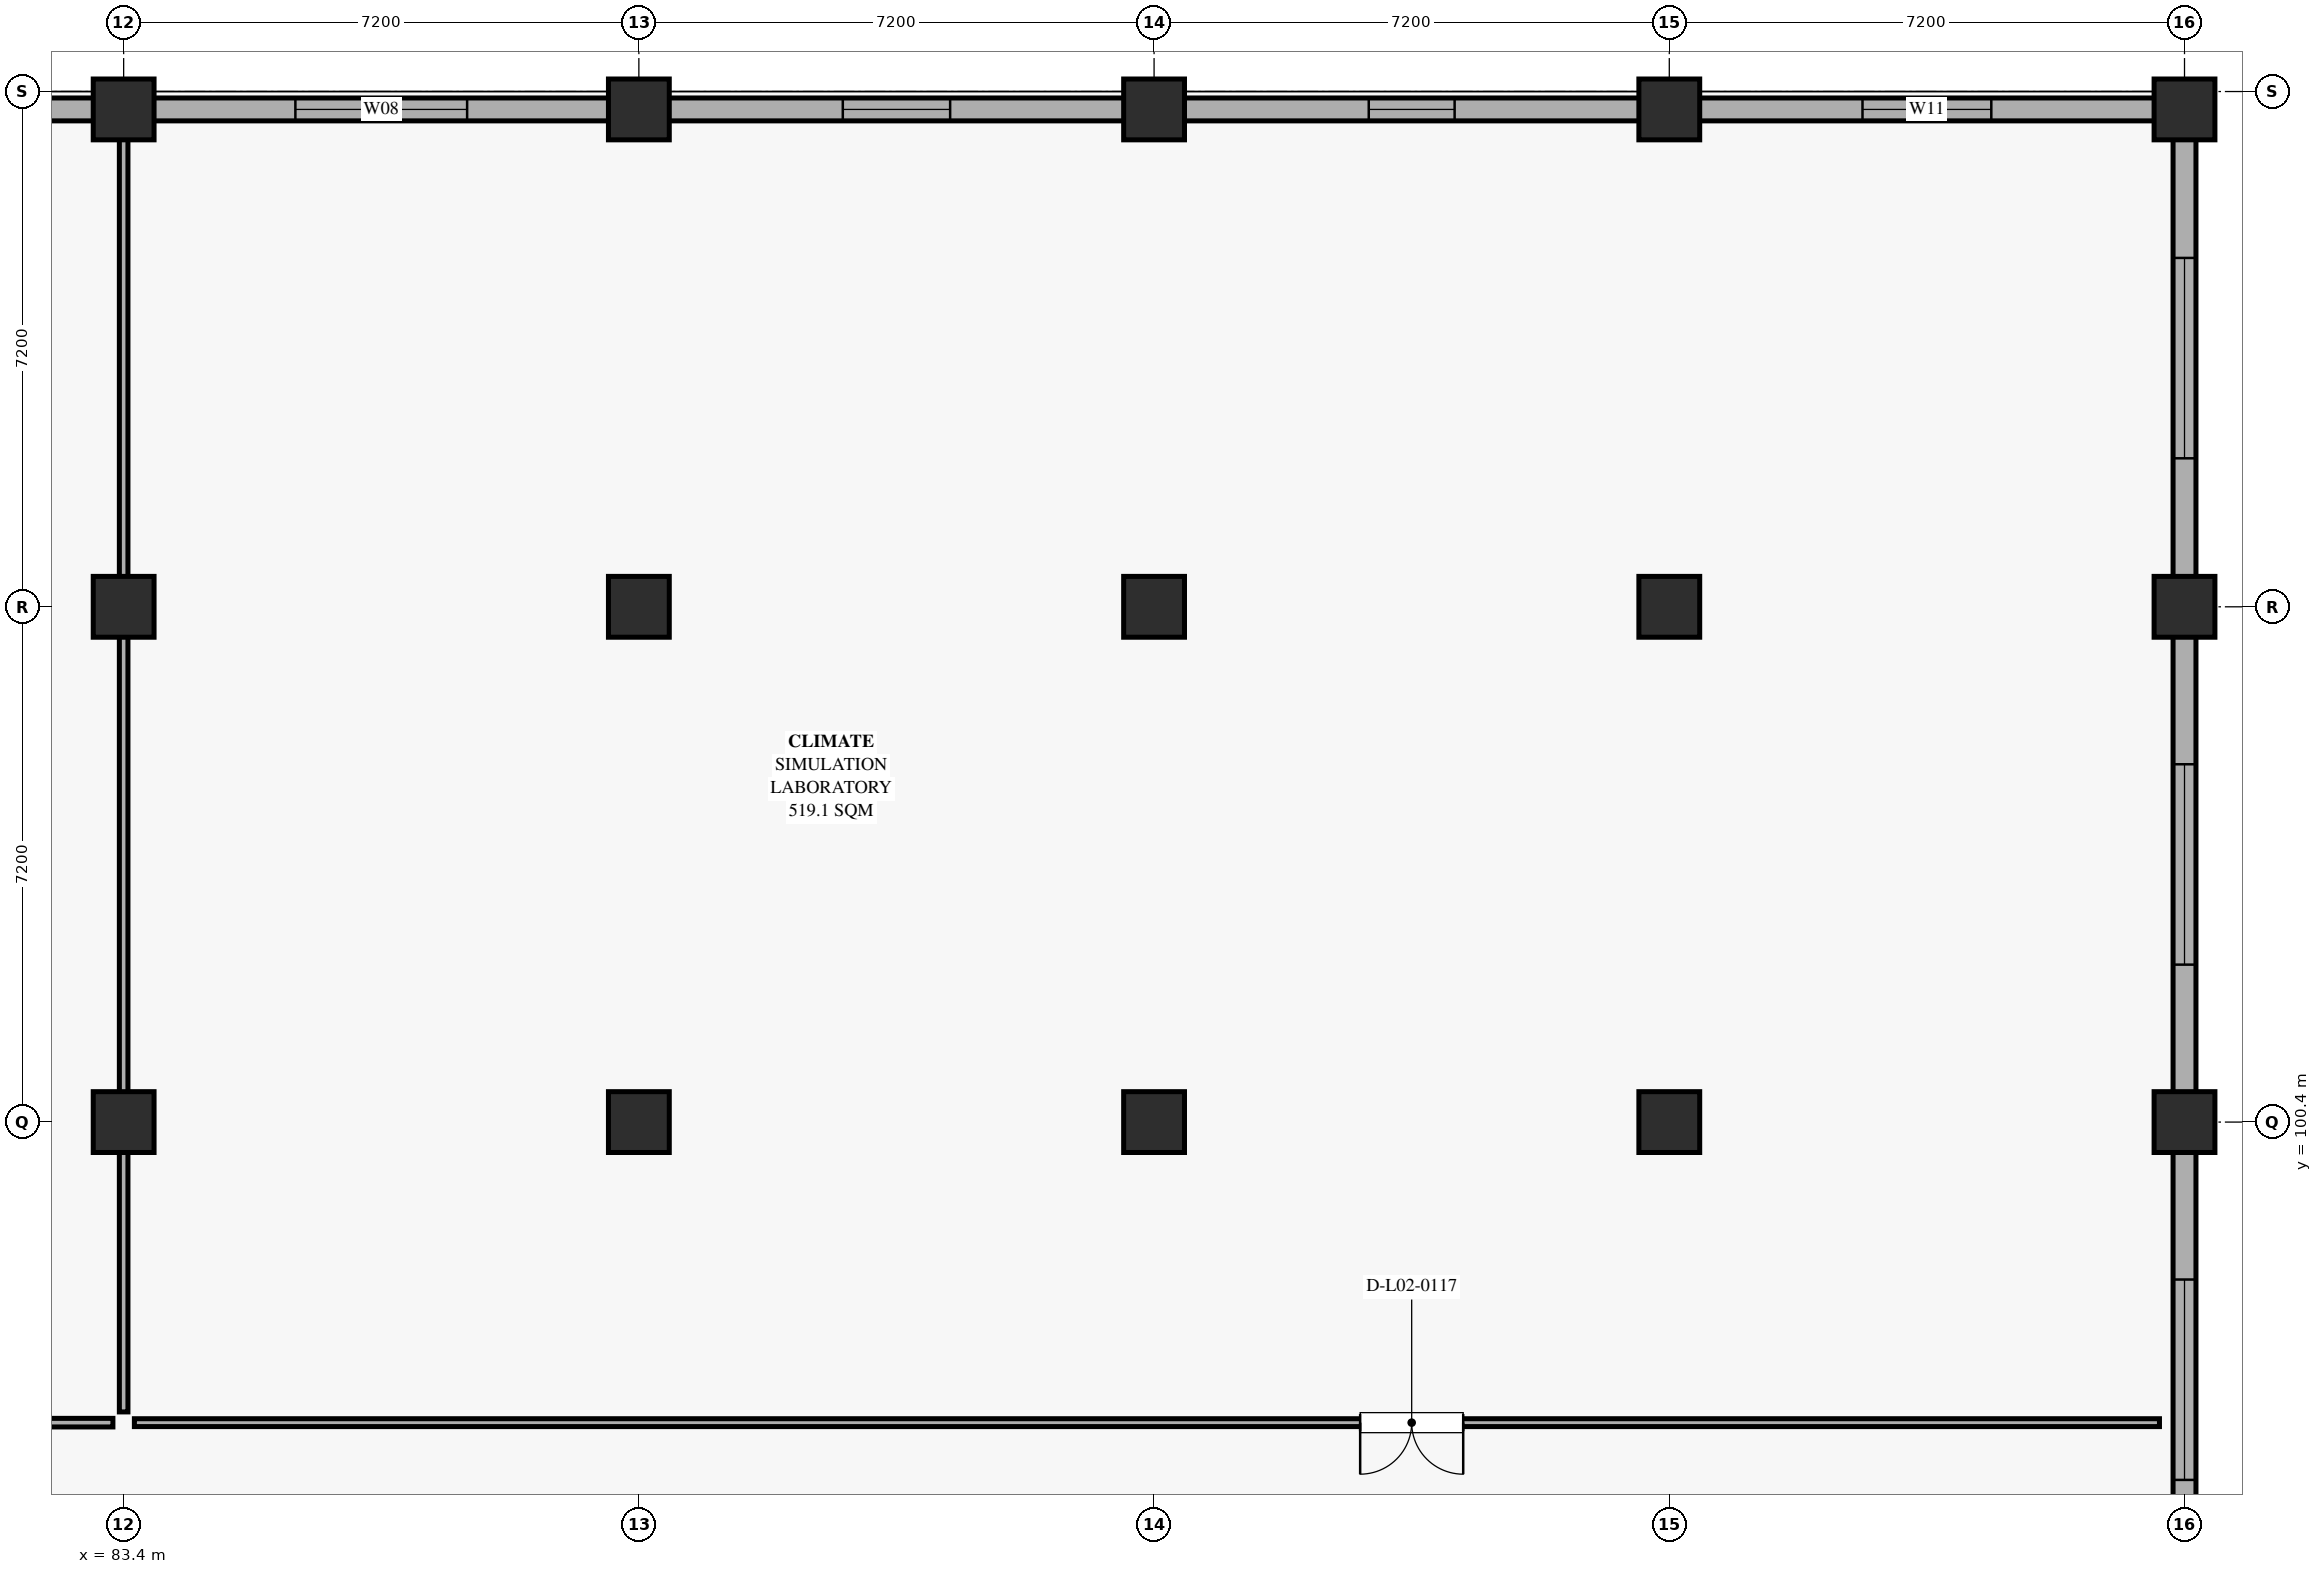
"""IFC4 building model, lengths in metres.
Left out: names, types, materials, properties, quantities, classifications, styles, units other than length and angle.
Written with IfcOpenShell. Run it as: python <this file> out.ifc"""

import sys

from ifc_helpers import new_model, si_unit, direction, frame, frame_2d, origin, origin_2d, place, context, subcontext, project, spatial, rectangle, extrude, element, fill, save


model = new_model("IFC4")
c1 = context("Model", 3, precision=1e-05, world=origin(), true_north=direction((0.0, 1.0)))
c2 = subcontext(c1, "Body", "Model", "MODEL_VIEW")
j1 = project(units=[si_unit("LENGTHUNIT", "METRE"), si_unit("PLANEANGLEUNIT", "RADIAN")], contexts=[c1])
p1 = place(None, origin())
s1 = spatial("IfcSite", under=j1, at=p1, CompositionType="ELEMENT")
p2 = place(p1, origin())
s2 = spatial("IfcBuilding", under=s1, at=p2, CompositionType="ELEMENT")
p3 = place(p2, frame((0.0, 0.0, 10.44)))
s3 = spatial("IfcBuildingStorey", under=s2, at=p3, CompositionType="ELEMENT", Elevation=10.44)
for number, where, z_axis, x_axis in (
    (1, (83.4, 100.4, 0.0), (0.0, 0.0, 1.0), (1.0, 0.0, 0.0)),
    (2, (90.6, 100.4, 0.0), (0.0, 0.0, 1.0), (1.0, 0.0, 0.0)),
    (3, (97.8, 100.4, 0.0), (0.0, 0.0, 1.0), (1.0, 0.0, 0.0)),
    (4, (105.0, 100.4, 0.0), (0.0, 0.0, 1.0), (1.0, 0.0, 0.0)),
    (5, (112.2, 100.4, 0.0), (0.0, 0.0, 1.0), (1.0, 0.0, 0.0)),
    (6, (83.4, 107.6, 0.0), (0.0, 0.0, 1.0), (1.0, 0.0, 0.0)),
    (7, (90.6, 107.6, 0.0), (0.0, 0.0, 1.0), (1.0, 0.0, 0.0)),
    (8, (97.8, 107.6, 0.0), (0.0, 0.0, 1.0), (1.0, 0.0, 0.0)),
    (9, (105.0, 107.6, 0.0), (0.0, 0.0, 1.0), (1.0, 0.0, 0.0)),
    (10, (112.2, 107.6, 0.0), (0.0, 0.0, 1.0), (1.0, 0.0, 0.0)),
    (11, (83.4, 114.55, 0.0), (0.0, 0.0, 1.0), (1.0, 0.0, 0.0)),
    (12, (90.6, 114.55, 0.0), (0.0, 0.0, 1.0), (1.0, 0.0, 0.0)),
    (13, (97.8, 114.55, 0.0), (0.0, 0.0, 1.0), (1.0, 0.0, 0.0)),
    (14, (105.0, 114.55, 0.0), (0.0, 0.0, 1.0), (1.0, 0.0, 0.0)),
    (15, (112.2, 114.55, 0.0), (0.0, 0.0, 1.0), (1.0, 0.0, 0.0)),
):
    element("IfcColumn", number, at=place(p3, frame(where, z_axis=z_axis, x_axis=x_axis)), inside=s3, PredefinedType="COLUMN", context=c2, shape_type="SweptSolid", body=[
        extrude(rectangle(XDim=0.85, YDim=0.85, at=origin_2d()), origin(), (0.0, 0.0, 1.0), 4.68),
    ])
p4 = place(p3, frame((112.2, 99.99, 0.0), z_axis=(0.0, 0.0, 1.0), x_axis=(0.0, -1.0, 0.0)))
e16 = element("IfcWall", 16, at=p4, inside=s3, PredefinedType="SOLIDWALL", context=c2, shape_type="SweptSolid", body=[
    extrude(rectangle(XDim=6.38, YDim=0.32, at=frame_2d((3.19, 0.0))), origin(), (0.0, 0.0, 1.0), 3.18),
])
p5 = place(p4, frame((1.79, 0.0, 0.85)))
e17 = element("IfcOpeningElement", 17, at=p5, cuts=e16, PredefinedType="OPENING", context=c2, shape_type="SweptSolid", body=[
    extrude(rectangle(XDim=2.8, YDim=2.2, at=frame_2d((1.4, 1.1))), frame((0.0, 0.17, 0.0), z_axis=(0.0, -1.0, 0.0), x_axis=(1.0, 0.0, 0.0)), (0.0, 0.0, 1.0), 0.34),
])
p6 = place(p3, frame((112.2, 107.19, 0.0), z_axis=(0.0, 0.0, 1.0), x_axis=(0.0, -1.0, 0.0)))
e18 = element("IfcWall", 18, at=p6, inside=s3, PredefinedType="SOLIDWALL", context=c2, shape_type="SweptSolid", body=[
    extrude(rectangle(XDim=6.38, YDim=0.32, at=frame_2d((3.19, 0.0))), origin(), (0.0, 0.0, 1.0), 3.18),
])
p7 = place(p6, frame((1.79, 0.0, 0.85)))
e19 = element("IfcOpeningElement", 19, at=p7, cuts=e18, PredefinedType="OPENING", context=c2, shape_type="SweptSolid", body=[
    extrude(rectangle(XDim=2.8, YDim=2.2, at=frame_2d((1.4, 1.1))), frame((0.0, 0.17, 0.0), z_axis=(0.0, -1.0, 0.0), x_axis=(1.0, 0.0, 0.0)), (0.0, 0.0, 1.0), 0.34),
])
p8 = place(p3, frame((112.2, 114.14, 0.0), z_axis=(0.0, 0.0, 1.0), x_axis=(0.0, -1.0, 0.0)))
e20 = element("IfcWall", 20, at=p8, inside=s3, PredefinedType="SOLIDWALL", context=c2, shape_type="SweptSolid", body=[
    extrude(rectangle(XDim=6.13, YDim=0.32, at=frame_2d((3.065, 0.0))), origin(), (0.0, 0.0, 1.0), 3.18),
])
p9 = place(p8, frame((1.665, 0.0, 0.85)))
e21 = element("IfcOpeningElement", 21, at=p9, cuts=e20, PredefinedType="OPENING", context=c2, shape_type="SweptSolid", body=[
    extrude(rectangle(XDim=2.8, YDim=2.2, at=frame_2d((1.4, 1.1))), frame((0.0, 0.17, 0.0), z_axis=(0.0, -1.0, 0.0), x_axis=(1.0, 0.0, 0.0)), (0.0, 0.0, 1.0), 0.34),
])
p10 = place(p3, frame((76.61, 114.55, 0.0), z_axis=(0.0, 0.0, 1.0), x_axis=(1.0, 0.0, 0.0)))
e22 = element("IfcWall", 22, at=p10, inside=s3, PredefinedType="SOLIDWALL", context=c2, shape_type="SweptSolid", body=[
    extrude(rectangle(XDim=6.38, YDim=0.32, at=frame_2d((3.19, 0.0))), origin(), (0.0, 0.0, 1.0), 3.18),
])
p11 = place(p10, frame((2.14, 0.0, 0.85)))
e23 = element("IfcOpeningElement", 23, at=p11, cuts=e22, PredefinedType="OPENING", context=c2, shape_type="SweptSolid", body=[
    extrude(rectangle(XDim=2.1, YDim=2.1, at=frame_2d((1.05, 1.05))), frame((0.0, 0.17, 0.0), z_axis=(0.0, -1.0, 0.0), x_axis=(1.0, 0.0, 0.0)), (0.0, 0.0, 1.0), 0.34),
])
p12 = place(p3, frame((83.81, 114.55, 0.0), z_axis=(0.0, 0.0, 1.0), x_axis=(1.0, 0.0, 0.0)))
e24 = element("IfcWall", 24, at=p12, inside=s3, PredefinedType="SOLIDWALL", context=c2, shape_type="SweptSolid", body=[
    extrude(rectangle(XDim=6.38, YDim=0.32, at=frame_2d((3.19, 0.0))), origin(), (0.0, 0.0, 1.0), 3.18),
])
p13 = place(p12, frame((1.99, 0.0, 0.85)))
e25 = element("IfcOpeningElement", 25, at=p13, cuts=e24, PredefinedType="OPENING", context=c2, shape_type="SweptSolid", body=[
    extrude(rectangle(XDim=2.4, YDim=2.1, at=frame_2d((1.2, 1.05))), frame((0.0, 0.17, 0.0), z_axis=(0.0, -1.0, 0.0), x_axis=(1.0, 0.0, 0.0)), (0.0, 0.0, 1.0), 0.34),
])
p14 = place(p3, frame((91.01, 114.55, 0.0), z_axis=(0.0, 0.0, 1.0), x_axis=(1.0, 0.0, 0.0)))
e26 = element("IfcWall", 26, at=p14, inside=s3, PredefinedType="SOLIDWALL", context=c2, shape_type="SweptSolid", body=[
    extrude(rectangle(XDim=6.38, YDim=0.32, at=frame_2d((3.19, 0.0))), origin(), (0.0, 0.0, 1.0), 3.18),
])
p15 = place(p14, frame((2.44, 0.0, 0.85)))
e27 = element("IfcOpeningElement", 27, at=p15, cuts=e26, PredefinedType="OPENING", context=c2, shape_type="SweptSolid", body=[
    extrude(rectangle(XDim=1.5, YDim=2.1, at=frame_2d((0.75, 1.05))), frame((0.0, 0.17, 0.0), z_axis=(0.0, -1.0, 0.0), x_axis=(1.0, 0.0, 0.0)), (0.0, 0.0, 1.0), 0.34),
])
p16 = place(p3, frame((98.21, 114.55, 0.0), z_axis=(0.0, 0.0, 1.0), x_axis=(1.0, 0.0, 0.0)))
e28 = element("IfcWall", 28, at=p16, inside=s3, PredefinedType="SOLIDWALL", context=c2, shape_type="SweptSolid", body=[
    extrude(rectangle(XDim=6.38, YDim=0.32, at=frame_2d((3.19, 0.0))), origin(), (0.0, 0.0, 1.0), 3.18),
])
p17 = place(p16, frame((2.59, 0.0, 0.85)))
e29 = element("IfcOpeningElement", 29, at=p17, cuts=e28, PredefinedType="OPENING", context=c2, shape_type="SweptSolid", body=[
    extrude(rectangle(XDim=1.2, YDim=2.1, at=frame_2d((0.6, 1.05))), frame((0.0, 0.17, 0.0), z_axis=(0.0, -1.0, 0.0), x_axis=(1.0, 0.0, 0.0)), (0.0, 0.0, 1.0), 0.34),
])
p18 = place(p3, frame((105.41, 114.55, 0.0), z_axis=(0.0, 0.0, 1.0), x_axis=(1.0, 0.0, 0.0)))
e30 = element("IfcWall", 30, at=p18, inside=s3, PredefinedType="SOLIDWALL", context=c2, shape_type="SweptSolid", body=[
    extrude(rectangle(XDim=6.38, YDim=0.32, at=frame_2d((3.19, 0.0))), origin(), (0.0, 0.0, 1.0), 3.18),
])
p19 = place(p18, frame((2.29, 0.0, 0.85)))
e31 = element("IfcOpeningElement", 31, at=p19, cuts=e30, PredefinedType="OPENING", context=c2, shape_type="SweptSolid", body=[
    extrude(rectangle(XDim=1.8, YDim=1.8, at=frame_2d((0.9, 0.9))), frame((0.0, 0.17, 0.0), z_axis=(0.0, -1.0, 0.0), x_axis=(1.0, 0.0, 0.0)), (0.0, 0.0, 1.0), 0.34),
])
p20 = place(p3, frame((83.25, 96.2, 0.0), z_axis=(0.0, 0.0, 1.0), x_axis=(-1.0, 0.0, 0.0)))
e32 = element("IfcWall", 32, at=p20, inside=s3, PredefinedType="PARTITIONING", context=c2, shape_type="SweptSolid", body=[
    extrude(rectangle(XDim=21.1, YDim=0.12, at=frame_2d((10.55, 0.0))), origin(), (0.0, 0.0, 1.0), 3.16),
])
p21 = place(p20, frame((9.96, 0.0, 0.0)))
e33 = element("IfcOpeningElement", 33, at=p21, cuts=e32, PredefinedType="OPENING", context=c2, shape_type="SweptSolid", body=[
    extrude(rectangle(XDim=1.38, YDim=2.22, at=frame_2d((0.69, 1.11))), frame((0.0, 0.07, 0.0), z_axis=(0.0, -1.0, 0.0), x_axis=(1.0, 0.0, 0.0)), (0.0, 0.0, 1.0), 0.14),
])
p22 = place(p3, frame((83.4, 114.2, 0.0), z_axis=(0.0, 0.0, 1.0), x_axis=(0.0, -1.0, 0.0)))
e34 = element("IfcWall", 34, at=p22, inside=s3, PredefinedType="PARTITIONING", context=c2, shape_type="SweptSolid", body=[
    extrude(rectangle(XDim=17.85, YDim=0.12, at=frame_2d((8.925, 0.0))), origin(), (0.0, 0.0, 1.0), 3.16),
])
p23 = place(p3, frame((111.85, 96.2, 0.0), z_axis=(0.0, 0.0, 1.0), x_axis=(-1.0, 0.0, 0.0)))
e35 = element("IfcWall", 35, at=p23, inside=s3, PredefinedType="PARTITIONING", context=c2, shape_type="SweptSolid", body=[
    extrude(rectangle(XDim=28.3, YDim=0.11, at=frame_2d((14.15, 0.0))), origin(), (0.0, 0.0, 1.0), 3.16),
])
p24 = place(p23, frame((9.73, 0.0, 0.0)))
e36 = element("IfcOpeningElement", 36, at=p24, cuts=e35, PredefinedType="OPENING", context=c2, shape_type="SweptSolid", body=[
    extrude(rectangle(XDim=1.44, YDim=2.05, at=frame_2d((0.72, 1.025))), frame((0.0, 0.065, 0.0), z_axis=(0.0, -1.0, 0.0), x_axis=(1.0, 0.0, 0.0)), (0.0, 0.0, 1.0), 0.13),
])
p25 = place(p5, origin())
e37 = element("IfcWindow", 37, at=p25, inside=s3, PartitioningType="DOUBLE_PANEL_VERTICAL", PredefinedType="WINDOW", context=c2, shape_type="SweptSolid", body=[
    extrude(rectangle(XDim=2.8, YDim=2.2, at=frame_2d((1.4, 1.1))), frame((0.0, 0.03, 0.0), z_axis=(0.0, -1.0, 0.0), x_axis=(1.0, 0.0, 0.0)), (0.0, 0.0, 1.0), 0.06),
])
fill(e17, e37)
p26 = place(p7, origin())
e38 = element("IfcWindow", 38, at=p26, inside=s3, PartitioningType="DOUBLE_PANEL_VERTICAL", PredefinedType="WINDOW", context=c2, shape_type="SweptSolid", body=[
    extrude(rectangle(XDim=2.8, YDim=2.2, at=frame_2d((1.4, 1.1))), frame((0.0, 0.03, 0.0), z_axis=(0.0, -1.0, 0.0), x_axis=(1.0, 0.0, 0.0)), (0.0, 0.0, 1.0), 0.06),
])
fill(e19, e38)
p27 = place(p9, origin())
e39 = element("IfcWindow", 39, at=p27, inside=s3, PartitioningType="DOUBLE_PANEL_VERTICAL", PredefinedType="WINDOW", context=c2, shape_type="SweptSolid", body=[
    extrude(rectangle(XDim=2.8, YDim=2.2, at=frame_2d((1.4, 1.1))), frame((0.0, 0.03, 0.0), z_axis=(0.0, -1.0, 0.0), x_axis=(1.0, 0.0, 0.0)), (0.0, 0.0, 1.0), 0.06),
])
fill(e21, e39)
p28 = place(p13, origin())
e40 = element("IfcWindow", 40, at=p28, inside=s3, PartitioningType="DOUBLE_PANEL_VERTICAL", PredefinedType="WINDOW", context=c2, shape_type="SweptSolid", body=[
    extrude(rectangle(XDim=2.4, YDim=2.1, at=frame_2d((1.2, 1.05))), frame((0.0, 0.03, 0.0), z_axis=(0.0, -1.0, 0.0), x_axis=(1.0, 0.0, 0.0)), (0.0, 0.0, 1.0), 0.06),
])
fill(e25, e40)
p29 = place(p15, origin())
e41 = element("IfcWindow", 41, at=p29, inside=s3, PartitioningType="SINGLE_PANEL", PredefinedType="WINDOW", context=c2, shape_type="SweptSolid", body=[
    extrude(rectangle(XDim=1.5, YDim=2.1, at=frame_2d((0.75, 1.05))), frame((0.0, 0.03, 0.0), z_axis=(0.0, -1.0, 0.0), x_axis=(1.0, 0.0, 0.0)), (0.0, 0.0, 1.0), 0.06),
])
fill(e27, e41)
p30 = place(p17, origin())
e42 = element("IfcWindow", 42, at=p30, inside=s3, PartitioningType="SINGLE_PANEL", PredefinedType="WINDOW", context=c2, shape_type="SweptSolid", body=[
    extrude(rectangle(XDim=1.2, YDim=2.1, at=frame_2d((0.6, 1.05))), frame((0.0, 0.03, 0.0), z_axis=(0.0, -1.0, 0.0), x_axis=(1.0, 0.0, 0.0)), (0.0, 0.0, 1.0), 0.06),
])
fill(e29, e42)
p31 = place(p19, origin())
e43 = element("IfcWindow", 43, at=p31, inside=s3, PartitioningType="DOUBLE_PANEL_VERTICAL", PredefinedType="WINDOW", context=c2, shape_type="SweptSolid", body=[
    extrude(rectangle(XDim=1.8, YDim=1.8, at=frame_2d((0.9, 0.9))), frame((0.0, 0.03, 0.0), z_axis=(0.0, -1.0, 0.0), x_axis=(1.0, 0.0, 0.0)), (0.0, 0.0, 1.0), 0.06),
])
fill(e31, e43)
p32 = place(p24, origin())
e44 = element("IfcDoor", 44, at=p32, inside=s3, OperationType="DOUBLE_DOOR_SINGLE_SWING", PredefinedType="DOOR", context=c2, shape_type="SweptSolid", body=[
    extrude(rectangle(XDim=1.44, YDim=2.05, at=frame_2d((0.72, 1.025))), frame((0.0, 0.025, 0.0), z_axis=(0.0, -1.0, 0.0), x_axis=(1.0, 0.0, 0.0)), (0.0, 0.0, 1.0), 0.05),
])
fill(e36, e44)
save(model, sys.argv[1])
